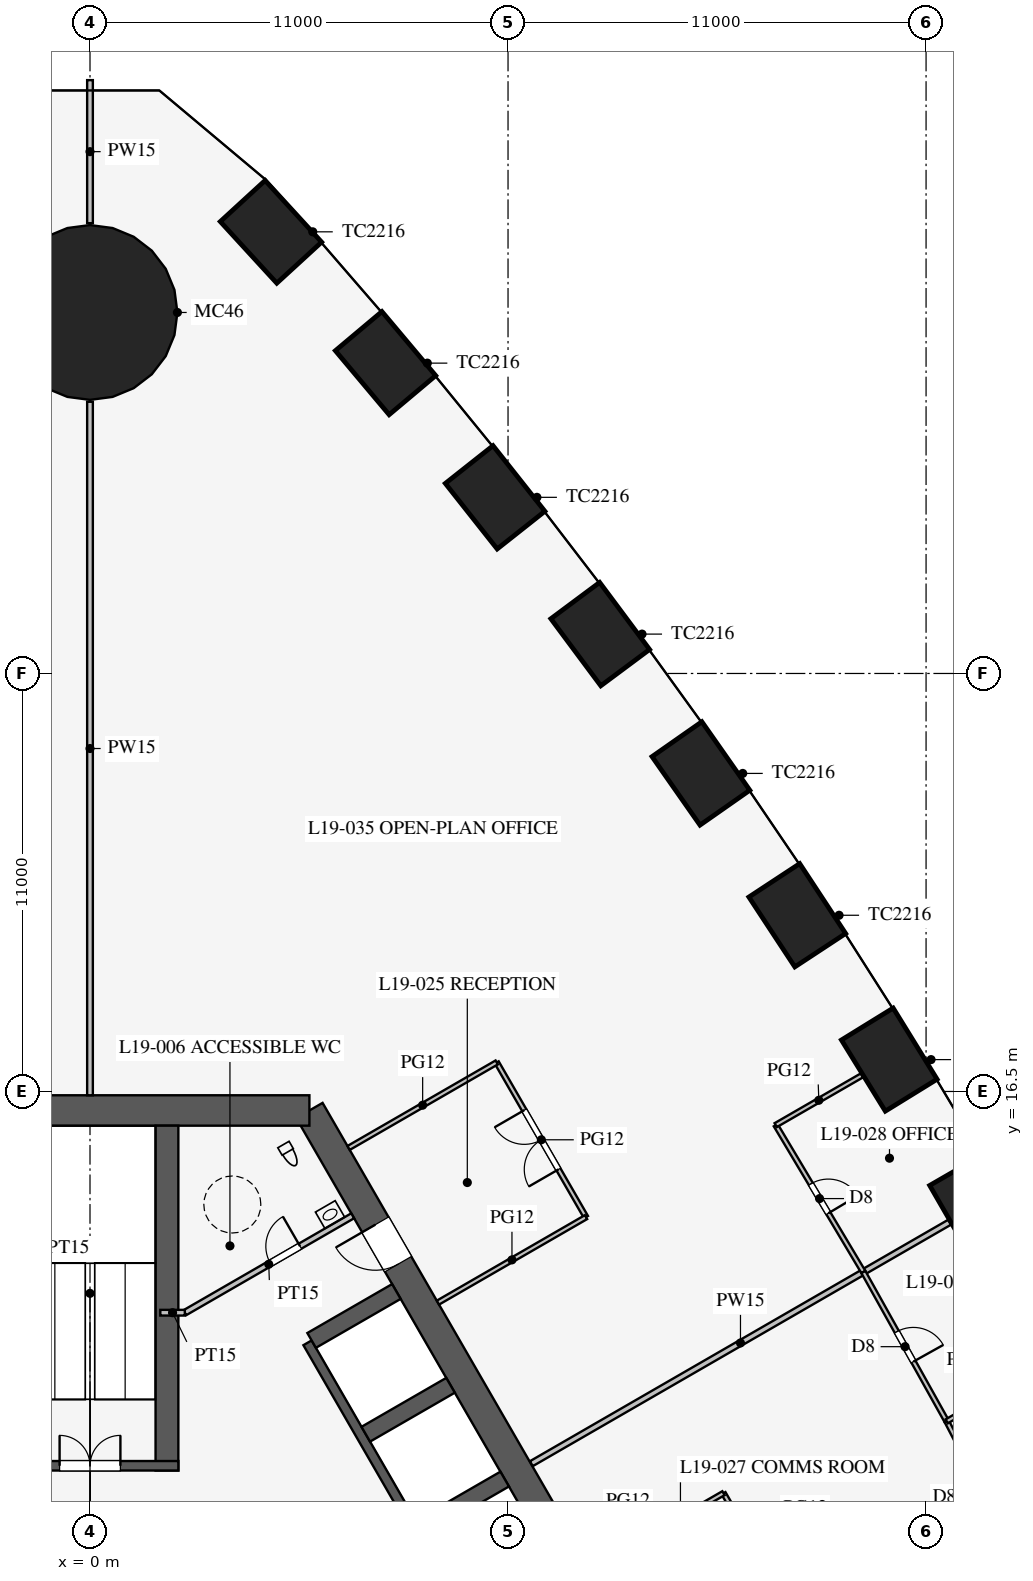
"""IFC4 building model, lengths in metres.
Left out: names, types, materials, properties, quantities, classifications, styles, units other than length and angle.
Written with IfcOpenShell. Run it as: python <this file> out.ifc"""

import sys

from ifc_helpers import new_model, si_unit, direction, frame, frame_2d, origin, origin_2d, place, context, subcontext, project, spatial, rectangle, circle, extrude, element, fill, save


model = new_model("IFC4")
c1 = context("Model", 3, precision=1e-05, world=origin(), true_north=direction((0.0, 1.0)))
c2 = subcontext(c1, "Body", "Model", "MODEL_VIEW")
j1 = project(units=[si_unit("LENGTHUNIT", "METRE"), si_unit("PLANEANGLEUNIT", "RADIAN")], contexts=[c1])
p1 = place(None, origin())
s1 = spatial("IfcSite", under=j1, at=p1, CompositionType="ELEMENT")
p2 = place(p1, origin())
s2 = spatial("IfcBuilding", under=s1, at=p2, CompositionType="ELEMENT")
p3 = place(p2, frame((0.0, 0.0, 83.7)))
s3 = spatial("IfcBuildingStorey", under=s2, at=p3, CompositionType="ELEMENT", Elevation=83.7)
for number, where, z_axis, x_axis in (
    (1, (23.338, 13.474, 0.0), (0.0, 0.0, 1.0), (-0.5, 0.866, 0.0)),
    (2, (21.031, 17.339, 0.0), (0.0, 0.0, 1.0), (-0.525, 0.851, 0.0)),
    (3, (18.611, 21.137, 0.0), (0.0, 0.0, 1.0), (-0.549, 0.836, 0.0)),
    (4, (16.076, 24.87, 0.0), (0.0, 0.0, 1.0), (-0.574, 0.819, 0.0)),
    (5, (13.426, 28.536, 0.0), (0.0, 0.0, 1.0), (-0.597, 0.802, 0.0)),
    (6, (10.66, 32.135, 0.0), (0.0, 0.0, 1.0), (-0.62, 0.784, 0.0)),
    (7, (7.776, 35.667, 0.0), (0.0, 0.0, 1.0), (-0.643, 0.766, 0.0)),
    (8, (4.762, 39.122, 0.0), (0.0, 0.0, 1.0), (-0.676, 0.737, 0.0)),
):
    element("IfcColumn", number, at=place(p3, frame(where, z_axis=z_axis, x_axis=x_axis)), inside=s3, PredefinedType="COLUMN", context=c2, shape_type="SweptSolid", body=[
        extrude(rectangle(XDim=2.2, YDim=1.6, at=origin_2d()), origin(), (0.0, 0.0, 1.0), 4.2),
    ])
p4 = place(p3, frame((0.0, 37.0, 0.0), z_axis=(0.0, 0.0, 1.0), x_axis=(1.0, 0.0, 0.0)))
e9 = element("IfcColumn", 9, at=p4, inside=s3, PredefinedType="COLUMN", context=c2, shape_type="SweptSolid", body=[
    extrude(circle(Radius=2.3, at=origin_2d()), origin(), (0.0, 0.0, 1.0), 4.2),
])
p5 = place(p3, frame((16.743, -3.0, 0.0), z_axis=(0.0, 0.0, 1.0), x_axis=(-0.500002442456, 0.866023993627, 0.0)))
e10 = element("IfcWall", 10, at=p5, inside=s3, PredefinedType="SHEAR", context=c2, shape_type="SweptSolid", body=[
    extrude(rectangle(XDim=21.939, YDim=0.8, at=frame_2d((10.97, 0.0))), origin(), (0.0, 0.0, 1.0), 4.2),
])
p6 = place(p5, frame((17.27, 0.0, 0.0)))
e11 = element("IfcOpeningElement", 11, at=p6, cuts=e10, PredefinedType="OPENING", context=c2, shape_type="SweptSolid", body=[
    extrude(rectangle(XDim=1.2, YDim=2.1, at=frame_2d((0.6, 1.05))), frame((0.0, 0.41, 0.0), z_axis=(0.0, -1.0, 0.0), x_axis=(1.0, 0.0, 0.0)), (0.0, 0.0, 1.0), 0.82),
])
p7 = place(p5, frame((3.47, 0.0, 0.0)))
e12 = element("IfcOpeningElement", 12, at=p7, cuts=e10, PredefinedType="OPENING", context=c2, shape_type="SweptSolid", body=[
    extrude(rectangle(XDim=1.2, YDim=2.1, at=frame_2d((0.6, 1.05))), frame((0.0, 0.41, 0.0), z_axis=(0.0, -1.0, 0.0), x_axis=(1.0, 0.0, 0.0)), (0.0, 0.0, 1.0), 0.82),
])
p8 = place(p3, frame((5.773, 16.0, 0.0), z_axis=(0.0, 0.0, 1.0), x_axis=(-1.0, 0.0, 0.0)))
e13 = element("IfcWall", 13, at=p8, inside=s3, PredefinedType="SHEAR", context=c2, shape_type="SweptSolid", body=[
    extrude(rectangle(XDim=11.547, YDim=0.8, at=frame_2d((5.773, 0.0))), origin(), (0.0, 0.0, 1.0), 4.2),
])
p9 = place(p3, frame((11.424, 0.014, 0.0), z_axis=(0.0, 0.0, 1.0), x_axis=(-0.500001763848, 0.866024385424, 0.0)))
e14 = element("IfcWall", 14, at=p9, inside=s3, PredefinedType="SHEAR", context=c2, shape_type="SweptSolid", body=[
    extrude(rectangle(XDim=11.4, YDim=0.25, at=frame_2d((5.7, 0.0))), origin(), (0.0, 0.0, 1.0), 4.2),
])
for number, where, z_axis, x_axis in (
    (15, (8.682, 5.012, 0.0), (0.0, 0.0, 1.0), (0.866, 0.5, 0.0)),
    (16, (7.257, 7.481, 0.0), (0.0, 0.0, 1.0), (0.866, 0.5, 0.0)),
):
    element("IfcWall", number, at=place(p3, frame(where, z_axis=z_axis, x_axis=x_axis)), inside=s3, PredefinedType="SHEAR", context=c2, shape_type="SweptSolid", body=[
        extrude(rectangle(XDim=2.575, YDim=0.45, at=frame_2d((1.288, 0.0))), origin(), (0.0, 0.0, 1.0), 4.2),
    ])
p10 = place(p3, frame((5.832, 9.949, 0.0), z_axis=(0.0, 0.0, 1.0), x_axis=(0.866029291668, 0.499993265928, 0.0)))
e17 = element("IfcWall", 17, at=p10, inside=s3, PredefinedType="SHEAR", context=c2, shape_type="SweptSolid", body=[
    extrude(rectangle(XDim=2.575, YDim=0.45, at=frame_2d((1.288, 0.0))), origin(), (0.0, 0.0, 1.0), 4.2),
])
p11 = place(p3, frame((2.025, 6.525, 0.0), z_axis=(0.0, 0.0, 1.0), x_axis=(0.0, 1.0, 0.0)))
e18 = element("IfcWall", 18, at=p11, inside=s3, PredefinedType="SHEAR", context=c2, shape_type="SweptSolid", body=[
    extrude(rectangle(XDim=9.075, YDim=0.6, at=frame_2d((4.538, 0.0))), origin(), (0.0, 0.0, 1.0), 4.2),
])
p12 = place(p3, frame((2.325, 6.65, 0.0), z_axis=(0.0, 0.0, 1.0), x_axis=(-1.0, 0.0, 0.0)))
e19 = element("IfcWall", 19, at=p12, inside=s3, PredefinedType="SHEAR", context=c2, shape_type="SweptSolid", body=[
    extrude(rectangle(XDim=4.65, YDim=0.25, at=frame_2d((2.325, 0.0))), origin(), (0.0, 0.0, 1.0), 4.2),
])
p13 = place(p12, frame((1.525, 0.0, 0.0)))
e20 = element("IfcOpeningElement", 20, at=p13, cuts=e19, PredefinedType="OPENING", context=c2, shape_type="SweptSolid", body=[
    extrude(rectangle(XDim=1.6, YDim=2.1, at=frame_2d((0.8, 1.05))), frame((0.0, 0.135, 0.0), z_axis=(0.0, -1.0, 0.0), x_axis=(1.0, 0.0, 0.0)), (0.0, 0.0, 1.0), 0.27),
])
p14 = place(p3, frame((2.495, 10.678, 0.0), z_axis=(0.0, 0.0, 1.0), x_axis=(0.86602216432, 0.500005610874, 0.0)))
e21 = element("IfcWall", 21, at=p14, inside=s3, PredefinedType="PARTITIONING", context=c2, shape_type="SweptSolid", body=[
    extrude(rectangle(XDim=5.1, YDim=0.15, at=frame_2d((2.55, 0.0))), origin(), (0.0, 0.0, 1.0), 4.0),
])
p15 = place(p14, frame((2.6, 0.0, 0.0)))
e22 = element("IfcOpeningElement", 22, at=p15, cuts=e21, PredefinedType="OPENING", context=c2, shape_type="SweptSolid", body=[
    extrude(rectangle(XDim=0.9, YDim=2.1, at=frame_2d((0.45, 1.05))), frame((0.0, 0.085, 0.0), z_axis=(0.0, -1.0, 0.0), x_axis=(1.0, 0.0, 0.0)), (0.0, 0.0, 1.0), 0.17),
])
p16 = place(p3, frame((2.495, 10.678, 0.0), z_axis=(0.0, 0.0, 1.0), x_axis=(-1.0, 0.0, 0.0)))
e23 = element("IfcWall", 23, at=p16, inside=s3, PredefinedType="PARTITIONING", context=c2, shape_type="SweptSolid", body=[
    extrude(rectangle(XDim=0.645, YDim=0.15, at=frame_2d((0.323, 0.0))), origin(), (0.0, 0.0, 1.0), 4.0),
])
p17 = place(p3, frame((0.0, 16.4, 0.0), z_axis=(0.0, 0.0, 1.0), x_axis=(0.0, 1.0, 0.0)))
e24 = element("IfcWall", 24, at=p17, inside=s3, PredefinedType="PARTITIONING", context=c2, shape_type="SweptSolid", body=[
    extrude(rectangle(XDim=18.25, YDim=0.15, at=frame_2d((9.125, 0.0))), origin(), (0.0, 0.0, 1.0), 2.3),
])
p18 = place(p3, frame((0.0, 39.35, 0.0), z_axis=(0.0, 0.0, 1.0), x_axis=(0.0, 1.0, 0.0)))
e25 = element("IfcWall", 25, at=p18, inside=s3, PredefinedType="PARTITIONING", context=c2, shape_type="SweptSolid", body=[
    extrude(rectangle(XDim=3.764, YDim=0.15, at=frame_2d((1.882, 0.0))), origin(), (0.0, 0.0, 1.0), 2.3),
])
p19 = place(p3, frame((11.613, 6.705, 0.0), z_axis=(0.0, 0.0, 1.0), x_axis=(0.866029791586, 0.499992400027, 0.0)))
e26 = element("IfcWall", 26, at=p19, inside=s3, PredefinedType="PARTITIONING", context=c2, shape_type="SweptSolid", body=[
    extrude(rectangle(XDim=12.709, YDim=0.15, at=frame_2d((6.354, 0.0))), origin(), (0.0, 0.0, 1.0), 2.6),
])
p20 = place(p3, frame((13.052, 13.194, 0.0), z_axis=(0.0, 0.0, 1.0), x_axis=(-0.499977259774, 0.866038532462, 0.0)))
e27 = element("IfcWall", 27, at=p20, inside=s3, PredefinedType="PARTITIONING", context=c2, shape_type="SweptSolid", body=[
    extrude(rectangle(XDim=4.7, YDim=0.12, at=frame_2d((2.35, 0.0))), origin(), (0.0, 0.0, 1.0), 2.9),
])
p21 = place(p20, frame((1.45, 0.0, 0.15)))
e28 = element("IfcOpeningElement", 28, at=p21, cuts=e27, PredefinedType="OPENING", context=c2, shape_type="SweptSolid", body=[
    extrude(rectangle(XDim=1.8, YDim=2.1, at=frame_2d((0.9, 1.05))), frame((0.0, 0.07, 0.0), z_axis=(0.0, -1.0, 0.0), x_axis=(1.0, 0.0, 0.0)), (0.0, 0.0, 1.0), 0.14),
])
p22 = place(p3, frame((17.869, 3.85, 0.0), z_axis=(0.0, 0.0, 1.0), x_axis=(-0.500001309137, 0.866024647952, 0.0)))
e29 = element("IfcWall", 29, at=p22, inside=s3, PredefinedType="PARTITIONING", context=c2, shape_type="SweptSolid", body=[
    extrude(rectangle(XDim=2.4, YDim=0.12, at=frame_2d((1.2, 0.0))), origin(), (0.0, 0.0, 1.0), 2.9),
])
p23 = place(p22, frame((0.75, 0.0, 0.15)))
e30 = element("IfcOpeningElement", 30, at=p23, cuts=e29, PredefinedType="OPENING", context=c2, shape_type="SweptSolid", body=[
    extrude(rectangle(XDim=0.9, YDim=2.1, at=frame_2d((0.45, 1.05))), frame((0.0, 0.07, 0.0), z_axis=(0.0, -1.0, 0.0), x_axis=(1.0, 0.0, 0.0)), (0.0, 0.0, 1.0), 0.14),
])
p24 = place(p3, frame((9.155, 10.944, 0.0), z_axis=(0.0, 0.0, 1.0), x_axis=(0.866017533419, 0.500013631625, 0.0)))
e31 = element("IfcWall", 31, at=p24, inside=s3, PredefinedType="PARTITIONING", context=c2, shape_type="SweptSolid", body=[
    extrude(rectangle(XDim=4.5, YDim=0.12, at=frame_2d((2.25, 0.0))), origin(), (0.0, 0.0, 1.0), 2.9),
])
p25 = place(p3, frame((6.805, 15.014, 0.0), z_axis=(0.0, 0.0, 1.0), x_axis=(0.866031096941, 0.499990139034, 0.0)))
e32 = element("IfcWall", 32, at=p25, inside=s3, PredefinedType="PARTITIONING", context=c2, shape_type="SweptSolid", body=[
    extrude(rectangle(XDim=4.5, YDim=0.12, at=frame_2d((2.25, 0.0))), origin(), (0.0, 0.0, 1.0), 2.9),
])
p26 = place(p3, frame((13.205, 3.929, 0.0), z_axis=(0.0, 0.0, 1.0), x_axis=(0.866026010844, 0.49999894854, 0.0)))
e33 = element("IfcWall", 33, at=p26, inside=s3, PredefinedType="PARTITIONING", context=c2, shape_type="SweptSolid", body=[
    extrude(rectangle(XDim=4.0, YDim=0.12, at=frame_2d((2.0, 0.0))), origin(), (0.0, 0.0, 1.0), 2.9),
])
p27 = place(p3, frame((20.351, 11.749, 0.0), z_axis=(0.0, 0.0, 1.0), x_axis=(-0.51252396108, 0.858672923364, 0.0)))
e34 = element("IfcWall", 34, at=p27, inside=s3, PredefinedType="PARTITIONING", context=c2, shape_type="SweptSolid", body=[
    extrude(rectangle(XDim=4.5, YDim=0.12, at=frame_2d((2.25, 0.0))), origin(), (0.0, 0.0, 1.0), 2.9),
])
p28 = place(p27, frame((1.8, 0.0, 0.15)))
e35 = element("IfcOpeningElement", 35, at=p28, cuts=e34, PredefinedType="OPENING", context=c2, shape_type="SweptSolid", body=[
    extrude(rectangle(XDim=0.9, YDim=2.1, at=frame_2d((0.45, 1.05))), frame((0.0, 0.07, 0.0), z_axis=(0.0, -1.0, 0.0), x_axis=(1.0, 0.0, 0.0)), (0.0, 0.0, 1.0), 0.14),
])
p29 = place(p3, frame((22.544, 7.82, 0.0), z_axis=(0.0, 0.0, 1.0), x_axis=(-0.487373854787, 0.873193406795, 0.0)))
e36 = element("IfcWall", 36, at=p29, inside=s3, PredefinedType="PARTITIONING", context=c2, shape_type="SweptSolid", body=[
    extrude(rectangle(XDim=4.5, YDim=0.12, at=frame_2d((2.25, 0.0))), origin(), (0.0, 0.0, 1.0), 2.9),
])
p30 = place(p29, frame((1.8, 0.0, 0.15)))
e37 = element("IfcOpeningElement", 37, at=p30, cuts=e36, PredefinedType="OPENING", context=c2, shape_type="SweptSolid", body=[
    extrude(rectangle(XDim=0.9, YDim=2.1, at=frame_2d((0.45, 1.05))), frame((0.0, 0.07, 0.0), z_axis=(0.0, -1.0, 0.0), x_axis=(1.0, 0.0, 0.0)), (0.0, 0.0, 1.0), 0.14),
])
p31 = place(p3, frame((24.624, 3.824, 0.0), z_axis=(0.0, 0.0, 1.0), x_axis=(-0.461810056307, 0.886978845235, 0.0)))
e38 = element("IfcWall", 38, at=p31, inside=s3, PredefinedType="PARTITIONING", context=c2, shape_type="SweptSolid", body=[
    extrude(rectangle(XDim=4.504, YDim=0.12, at=frame_2d((2.252, 0.0))), origin(), (0.0, 0.0, 1.0), 2.9),
])
p32 = place(p31, frame((1.8, 0.0, 0.15)))
e39 = element("IfcOpeningElement", 39, at=p32, cuts=e38, PredefinedType="OPENING", context=c2, shape_type="SweptSolid", body=[
    extrude(rectangle(XDim=0.9, YDim=2.1, at=frame_2d((0.45, 1.05))), frame((0.0, 0.07, 0.0), z_axis=(0.0, -1.0, 0.0), x_axis=(1.0, 0.0, 0.0)), (0.0, 0.0, 1.0), 0.14),
])
p33 = place(p3, frame((18.044, 15.614, 0.0), z_axis=(0.0, 0.0, 1.0), x_axis=(0.865991553875, 0.500058625179, 0.0)))
e40 = element("IfcWall", 40, at=p33, inside=s3, PredefinedType="PARTITIONING", context=c2, shape_type="SweptSolid", body=[
    extrude(rectangle(XDim=2.619, YDim=0.12, at=frame_2d((1.31, 0.0))), origin(), (0.0, 0.0, 1.0), 2.6),
])
p34 = place(p3, frame((22.544, 7.82, 0.0), z_axis=(0.0, 0.0, 1.0), x_axis=(0.866031916153, 0.499988720078, 0.0)))
e41 = element("IfcWall", 41, at=p34, inside=s3, PredefinedType="PARTITIONING", context=c2, shape_type="SweptSolid", body=[
    extrude(rectangle(XDim=2.619, YDim=0.12, at=frame_2d((1.31, 0.0))), origin(), (0.0, 0.0, 1.0), 2.6),
])
p35 = place(p15, origin())
e42 = element("IfcDoor", 42, at=p35, inside=s3, OperationType="SINGLE_SWING_RIGHT", PredefinedType="DOOR", context=c2, shape_type="SweptSolid", body=[
    extrude(rectangle(XDim=0.9, YDim=2.1, at=frame_2d((0.45, 1.05))), frame((0.0, 0.025, 0.0), z_axis=(0.0, -1.0, 0.0), x_axis=(1.0, 0.0, 0.0)), (0.0, 0.0, 1.0), 0.05),
])
fill(e22, e42)
p36 = place(p13, frame((1.6, 0.0, 0.0), z_axis=(0.0, 0.0, 1.0), x_axis=(-1.0, 0.0, 0.0)))
e43 = element("IfcDoor", 43, at=p36, inside=s3, OperationType="DOUBLE_DOOR_SINGLE_SWING", PredefinedType="DOOR", context=c2, shape_type="SweptSolid", body=[
    extrude(rectangle(XDim=1.6, YDim=2.1, at=frame_2d((0.8, 1.05))), frame((0.0, 0.025, 0.0), z_axis=(0.0, -1.0, 0.0), x_axis=(1.0, 0.0, 0.0)), (0.0, 0.0, 1.0), 0.05),
])
fill(e20, e43)
p37 = place(p6, origin())
e44 = element("IfcDoor", 44, at=p37, inside=s3, OperationType="SINGLE_SWING_RIGHT", PredefinedType="DOOR", context=c2, shape_type="SweptSolid", body=[
    extrude(rectangle(XDim=1.2, YDim=2.1, at=frame_2d((0.6, 1.05))), frame((0.0, 0.025, 0.0), z_axis=(0.0, -1.0, 0.0), x_axis=(1.0, 0.0, 0.0)), (0.0, 0.0, 1.0), 0.05),
])
fill(e11, e44)
p38 = place(p21, origin())
e45 = element("IfcDoor", 45, at=p38, inside=s3, OperationType="DOUBLE_DOOR_SINGLE_SWING", PredefinedType="DOOR", context=c2, shape_type="SweptSolid", body=[
    extrude(rectangle(XDim=1.8, YDim=2.1, at=frame_2d((0.9, 1.05))), frame((0.0, 0.025, 0.0), z_axis=(0.0, -1.0, 0.0), x_axis=(1.0, 0.0, 0.0)), (0.0, 0.0, 1.0), 0.05),
])
fill(e28, e45)
p39 = place(p28, frame((0.9, 0.0, 0.0), z_axis=(0.0, 0.0, 1.0), x_axis=(-1.0, 0.0, 0.0)))
e46 = element("IfcDoor", 46, at=p39, inside=s3, OperationType="SINGLE_SWING_RIGHT", PredefinedType="DOOR", context=c2, shape_type="SweptSolid", body=[
    extrude(rectangle(XDim=0.9, YDim=2.1, at=frame_2d((0.45, 1.05))), frame((0.0, 0.025, 0.0), z_axis=(0.0, -1.0, 0.0), x_axis=(1.0, 0.0, 0.0)), (0.0, 0.0, 1.0), 0.05),
])
fill(e35, e46)
p40 = place(p30, frame((0.9, 0.0, 0.0), z_axis=(0.0, 0.0, 1.0), x_axis=(-1.0, 0.0, 0.0)))
e47 = element("IfcDoor", 47, at=p40, inside=s3, OperationType="SINGLE_SWING_RIGHT", PredefinedType="DOOR", context=c2, shape_type="SweptSolid", body=[
    extrude(rectangle(XDim=0.9, YDim=2.1, at=frame_2d((0.45, 1.05))), frame((0.0, 0.025, 0.0), z_axis=(0.0, -1.0, 0.0), x_axis=(1.0, 0.0, 0.0)), (0.0, 0.0, 1.0), 0.05),
])
fill(e37, e47)
save(model, sys.argv[1])
